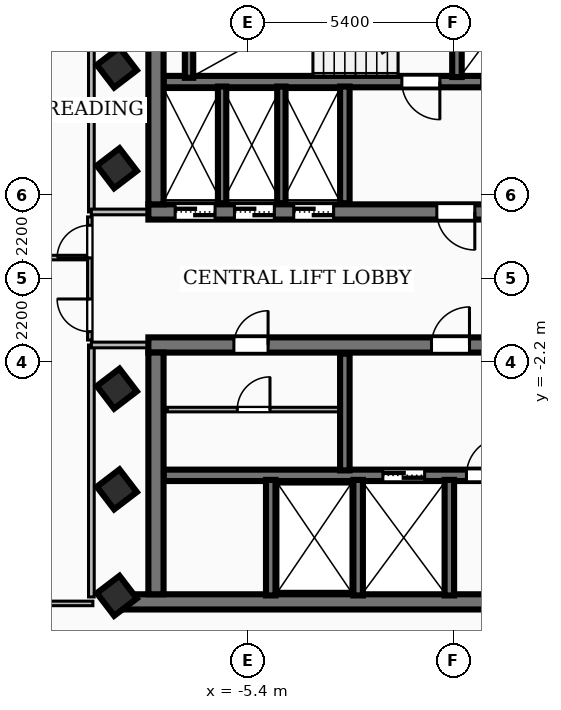
"""IFC4 building model, lengths in metres.
Left out: names, types, materials, properties, quantities, classifications, styles, units other than length and angle.
Written with IfcOpenShell. Run it as: python <this file> out.ifc"""

import sys

from ifc_helpers import new_model, si_unit, direction, frame, frame_2d, origin, origin_2d, place, context, subcontext, project, spatial, rectangle, extrude, element, fill, save


model = new_model("IFC4")
c1 = context("Model", 3, precision=1e-05, world=origin(), true_north=direction((0.0, 1.0)))
c2 = subcontext(c1, "Body", "Model", "MODEL_VIEW")
j1 = project(units=[si_unit("LENGTHUNIT", "METRE"), si_unit("PLANEANGLEUNIT", "RADIAN")], contexts=[c1])
p1 = place(None, origin())
s1 = spatial("IfcSite", under=j1, at=p1, CompositionType="ELEMENT")
p2 = place(p1, origin())
s2 = spatial("IfcBuilding", under=s1, at=p2, CompositionType="ELEMENT")
p3 = place(p2, frame((0.0, 0.0, 232.56)))
s3 = spatial("IfcBuildingStorey", under=s2, at=p3, CompositionType="ELEMENT", Elevation=232.56)
p4 = place(p3, frame((8.02, 1.75, 0.0), z_axis=(0.0, 0.0, 1.0), x_axis=(-1.0, 0.0, 0.0)))
e1 = element("IfcWall", 1, at=p4, inside=s3, PredefinedType="SHEAR", context=c2, shape_type="SweptSolid", body=[
    extrude(rectangle(XDim=16.04, YDim=0.4, at=frame_2d((8.02, 0.0))), origin(), (0.0, 0.0, 1.0), 3.14),
])
p5 = place(p4, frame((7.45, 0.0, 0.0)))
e2 = element("IfcOpeningElement", 2, at=p5, cuts=e1, PredefinedType="OPENING", context=c2, shape_type="SweptSolid", body=[
    extrude(rectangle(XDim=1.0, YDim=2.1, at=frame_2d((0.5, 1.05))), frame((0.0, 0.21, 0.0), z_axis=(0.0, -1.0, 0.0), x_axis=(1.0, 0.0, 0.0)), (0.0, 0.0, 1.0), 0.42),
])
p6 = place(p4, frame((14.285, 0.0, 0.0)))
e3 = element("IfcOpeningElement", 3, at=p6, cuts=e1, PredefinedType="OPENING", context=c2, shape_type="SweptSolid", body=[
    extrude(rectangle(XDim=1.05, YDim=2.15, at=frame_2d((0.525, 1.075))), frame((0.0, 0.21, 0.0), z_axis=(0.0, -1.0, 0.0), x_axis=(1.0, 0.0, 0.0)), (0.0, 0.0, 1.0), 0.42),
])
p7 = place(p4, frame((12.725, 0.0, 0.0)))
e4 = element("IfcOpeningElement", 4, at=p7, cuts=e1, PredefinedType="OPENING", context=c2, shape_type="SweptSolid", body=[
    extrude(rectangle(XDim=1.05, YDim=2.15, at=frame_2d((0.525, 1.075))), frame((0.0, 0.21, 0.0), z_axis=(0.0, -1.0, 0.0), x_axis=(1.0, 0.0, 0.0)), (0.0, 0.0, 1.0), 0.42),
])
p8 = place(p4, frame((11.165, 0.0, 0.0)))
e5 = element("IfcOpeningElement", 5, at=p8, cuts=e1, PredefinedType="OPENING", context=c2, shape_type="SweptSolid", body=[
    extrude(rectangle(XDim=1.05, YDim=2.15, at=frame_2d((0.525, 1.075))), frame((0.0, 0.21, 0.0), z_axis=(0.0, -1.0, 0.0), x_axis=(1.0, 0.0, 0.0)), (0.0, 0.0, 1.0), 0.42),
])
p9 = place(p4, frame((3.85, 0.0, 0.0)))
e6 = element("IfcOpeningElement", 6, at=p9, cuts=e1, PredefinedType="OPENING", context=c2, shape_type="SweptSolid", body=[
    extrude(rectangle(XDim=0.9, YDim=2.06, at=frame_2d((0.45, 1.03))), frame((0.0, 0.21, 0.0), z_axis=(0.0, -1.0, 0.0), x_axis=(1.0, 0.0, 0.0)), (0.0, 0.0, 1.0), 0.42),
])
p10 = place(p4, frame((2.35, 0.0, 0.0)))
e7 = element("IfcOpeningElement", 7, at=p10, cuts=e1, PredefinedType="OPENING", context=c2, shape_type="SweptSolid", body=[
    extrude(rectangle(XDim=0.9, YDim=2.06, at=frame_2d((0.45, 1.03))), frame((0.0, 0.21, 0.0), z_axis=(0.0, -1.0, 0.0), x_axis=(1.0, 0.0, 0.0)), (0.0, 0.0, 1.0), 0.42),
])
p11 = place(p4, frame((0.8, 0.0, 0.0)))
e8 = element("IfcOpeningElement", 8, at=p11, cuts=e1, PredefinedType="OPENING", context=c2, shape_type="SweptSolid", body=[
    extrude(rectangle(XDim=0.9, YDim=2.06, at=frame_2d((0.45, 1.03))), frame((0.0, 0.21, 0.0), z_axis=(0.0, -1.0, 0.0), x_axis=(1.0, 0.0, 0.0)), (0.0, 0.0, 1.0), 0.42),
])
p12 = place(p3, frame((-7.82, 1.95, 0.0), z_axis=(0.0, 0.0, 1.0), x_axis=(0.0, 1.0, 0.0)))
e9 = element("IfcWall", 9, at=p12, inside=s3, PredefinedType="SHEAR", context=c2, shape_type="SweptSolid", body=[
    extrude(rectangle(XDim=6.36, YDim=0.4, at=frame_2d((3.18, 0.0))), origin(), (0.0, 0.0, 1.0), 3.14),
])
p13 = place(p3, frame((7.62, 5.18, 0.0), z_axis=(0.0, 0.0, 1.0), x_axis=(-1.0, 0.0, 0.0)))
e10 = element("IfcWall", 10, at=p13, inside=s3, PredefinedType="SOLIDWALL", context=c2, shape_type="SweptSolid", body=[
    extrude(rectangle(XDim=15.24, YDim=0.3, at=frame_2d((7.62, 0.0))), origin(), (0.0, 0.0, 1.0), 3.14),
])
p14 = place(p13, frame((5.77, 0.0, 0.0)))
e11 = element("IfcOpeningElement", 11, at=p14, cuts=e10, PredefinedType="OPENING", context=c2, shape_type="SweptSolid", body=[
    extrude(rectangle(XDim=1.1, YDim=2.15, at=frame_2d((0.55, 1.075))), frame((0.0, 0.16, 0.0), z_axis=(0.0, -1.0, 0.0), x_axis=(1.0, 0.0, 0.0)), (0.0, 0.0, 1.0), 0.32),
])
p15 = place(p13, frame((2.97, 0.0, 0.0)))
e12 = element("IfcOpeningElement", 12, at=p15, cuts=e10, PredefinedType="OPENING", context=c2, shape_type="SweptSolid", body=[
    extrude(rectangle(XDim=1.1, YDim=2.15, at=frame_2d((0.55, 1.075))), frame((0.0, 0.16, 0.0), z_axis=(0.0, -1.0, 0.0), x_axis=(1.0, 0.0, 0.0)), (0.0, 0.0, 1.0), 0.32),
])
p16 = place(p13, frame((7.97, 0.0, 0.0)))
e13 = element("IfcOpeningElement", 13, at=p16, cuts=e10, PredefinedType="OPENING", context=c2, shape_type="SweptSolid", body=[
    extrude(rectangle(XDim=1.0, YDim=2.1, at=frame_2d((0.5, 1.05))), frame((0.0, 0.16, 0.0), z_axis=(0.0, -1.0, 0.0), x_axis=(1.0, 0.0, 0.0)), (0.0, 0.0, 1.0), 0.32),
])
p17 = place(p3, frame((8.78, -8.51, 0.0), z_axis=(0.0, 0.0, 1.0), x_axis=(-1.0, 0.0, 0.0)))
e14 = element("IfcWall", 14, at=p17, inside=s3, PredefinedType="SHEAR", context=c2, shape_type="SweptSolid", body=[
    extrude(rectangle(XDim=17.56, YDim=0.4, at=frame_2d((8.78, 0.0))), origin(), (0.0, 0.0, 1.0), 3.14),
])
p18 = place(p3, frame((-8.02, -1.75, 0.0), z_axis=(0.0, 0.0, 1.0), x_axis=(1.0, 0.0, 0.0)))
e15 = element("IfcWall", 15, at=p18, inside=s3, PredefinedType="SHEAR", context=c2, shape_type="SweptSolid", body=[
    extrude(rectangle(XDim=16.04, YDim=0.4, at=frame_2d((8.02, 0.0))), origin(), (0.0, 0.0, 1.0), 3.14),
])
p19 = place(p18, frame((7.45, 0.0, 0.0)))
e16 = element("IfcOpeningElement", 16, at=p19, cuts=e15, PredefinedType="OPENING", context=c2, shape_type="SweptSolid", body=[
    extrude(rectangle(XDim=1.0, YDim=2.1, at=frame_2d((0.5, 1.05))), frame((0.0, 0.21, 0.0), z_axis=(0.0, -1.0, 0.0), x_axis=(1.0, 0.0, 0.0)), (0.0, 0.0, 1.0), 0.42),
])
p20 = place(p18, frame((12.65, 0.0, 0.0)))
e17 = element("IfcOpeningElement", 17, at=p20, cuts=e15, PredefinedType="OPENING", context=c2, shape_type="SweptSolid", body=[
    extrude(rectangle(XDim=0.9, YDim=2.06, at=frame_2d((0.45, 1.03))), frame((0.0, 0.21, 0.0), z_axis=(0.0, -1.0, 0.0), x_axis=(1.0, 0.0, 0.0)), (0.0, 0.0, 1.0), 0.42),
])
p21 = place(p18, frame((2.25, 0.0, 0.0)))
e18 = element("IfcOpeningElement", 18, at=p21, cuts=e15, PredefinedType="OPENING", context=c2, shape_type="SweptSolid", body=[
    extrude(rectangle(XDim=0.9, YDim=2.06, at=frame_2d((0.45, 1.03))), frame((0.0, 0.21, 0.0), z_axis=(0.0, -1.0, 0.0), x_axis=(1.0, 0.0, 0.0)), (0.0, 0.0, 1.0), 0.42),
])
p22 = place(p3, frame((-7.82, -8.31, 0.0), z_axis=(0.0, 0.0, 1.0), x_axis=(0.0, 1.0, 0.0)))
e19 = element("IfcWall", 19, at=p22, inside=s3, PredefinedType="SHEAR", context=c2, shape_type="SweptSolid", body=[
    extrude(rectangle(XDim=6.36, YDim=0.4, at=frame_2d((3.18, 0.0))), origin(), (0.0, 0.0, 1.0), 3.14),
])
p23 = place(p3, frame((-7.62, -5.18, 0.0), z_axis=(0.0, 0.0, 1.0), x_axis=(1.0, 0.0, 0.0)))
e20 = element("IfcWall", 20, at=p23, inside=s3, PredefinedType="SOLIDWALL", context=c2, shape_type="SweptSolid", body=[
    extrude(rectangle(XDim=15.24, YDim=0.3, at=frame_2d((7.62, 0.0))), origin(), (0.0, 0.0, 1.0), 3.14),
])
p24 = place(p23, frame((5.77, 0.0, 0.0)))
e21 = element("IfcOpeningElement", 21, at=p24, cuts=e20, PredefinedType="OPENING", context=c2, shape_type="SweptSolid", body=[
    extrude(rectangle(XDim=1.1, YDim=2.15, at=frame_2d((0.55, 1.075))), frame((0.0, 0.16, 0.0), z_axis=(0.0, -1.0, 0.0), x_axis=(1.0, 0.0, 0.0)), (0.0, 0.0, 1.0), 0.32),
])
p25 = place(p23, frame((7.97, 0.0, 0.0)))
e22 = element("IfcOpeningElement", 22, at=p25, cuts=e20, PredefinedType="OPENING", context=c2, shape_type="SweptSolid", body=[
    extrude(rectangle(XDim=1.0, YDim=2.1, at=frame_2d((0.5, 1.05))), frame((0.0, 0.16, 0.0), z_axis=(0.0, -1.0, 0.0), x_axis=(1.0, 0.0, 0.0)), (0.0, 0.0, 1.0), 0.32),
])
p26 = place(p3, frame((-6.95, 5.28, 0.0), z_axis=(0.0, 0.0, 1.0), x_axis=(0.0, 1.0, 0.0)))
e23 = element("IfcWall", 23, at=p26, inside=s3, PredefinedType="SOLIDWALL", context=c2, shape_type="SweptSolid", body=[
    extrude(rectangle(XDim=3.06, YDim=0.22, at=frame_2d((1.53, 0.0))), origin(), (0.0, 0.0, 1.0), 3.14),
])
p27 = place(p3, frame((0.1, 5.3, 0.0), z_axis=(0.0, 0.0, 1.0), x_axis=(0.0, 1.0, 0.0)))
e24 = element("IfcWall", 24, at=p27, inside=s3, PredefinedType="SOLIDWALL", context=c2, shape_type="SweptSolid", body=[
    extrude(rectangle(XDim=3.04, YDim=0.25, at=frame_2d((1.52, 0.0))), origin(), (0.0, 0.0, 1.0), 3.14),
])
p28 = place(p3, frame((-2.85, 1.98, 0.0), z_axis=(0.0, 0.0, 1.0), x_axis=(0.0, 1.0, 0.0)))
e25 = element("IfcWall", 25, at=p28, inside=s3, PredefinedType="SOLIDWALL", context=c2, shape_type="SweptSolid", body=[
    extrude(rectangle(XDim=3.07, YDim=0.25, at=frame_2d((1.535, 0.0))), origin(), (0.0, 0.0, 1.0), 3.14),
])
for number, where, z_axis, x_axis in (
    (26, (-0.1, -8.34, 0.0), (0.0, 0.0, 1.0), (0.0, 1.0, 0.0)),
    (27, (-2.5, -8.34, 0.0), (0.0, 0.0, 1.0), (0.0, 1.0, 0.0)),
    (28, (-4.8, -8.34, 0.0), (0.0, 0.0, 1.0), (0.0, 1.0, 0.0)),
):
    element("IfcWall", number, at=place(p3, frame(where, z_axis=z_axis, x_axis=x_axis)), inside=s3, PredefinedType="SOLIDWALL", context=c2, shape_type="SweptSolid", body=[
        extrude(rectangle(XDim=3.04, YDim=0.25, at=frame_2d((1.52, 0.0))), origin(), (0.0, 0.0, 1.0), 3.14),
    ])
p29 = place(p3, frame((-2.85, -5.05, 0.0), z_axis=(0.0, 0.0, 1.0), x_axis=(0.0, 1.0, 0.0)))
e29 = element("IfcWall", 29, at=p29, inside=s3, PredefinedType="SOLIDWALL", context=c2, shape_type="SweptSolid", body=[
    extrude(rectangle(XDim=3.07, YDim=0.25, at=frame_2d((1.535, 0.0))), origin(), (0.0, 0.0, 1.0), 3.14),
])
for number, where, z_axis, x_axis in (
    (30, (-6.08, 1.98, 0.0), (0.0, 0.0, 1.0), (0.0, 1.0, 0.0)),
    (31, (-4.52, 1.98, 0.0), (0.0, 0.0, 1.0), (0.0, 1.0, 0.0)),
):
    element("IfcWall", number, at=place(p3, frame(where, z_axis=z_axis, x_axis=x_axis)), inside=s3, PredefinedType="SOLIDWALL", context=c2, shape_type="SweptSolid", body=[
        extrude(rectangle(XDim=3.07, YDim=0.22, at=frame_2d((1.535, 0.0))), origin(), (0.0, 0.0, 1.0), 3.14),
    ])
for number, where, z_axis, x_axis in (
    (32, (-8.85, -5.55, 0.0), (0.0, 0.0, 1.0), (0.794, 0.607, 0.0)),
    (33, (-8.85, -2.9, 0.0), (0.0, 0.0, 1.0), (0.794, 0.607, 0.0)),
    (34, (-8.85, 2.9, 0.0), (0.0, 0.0, 1.0), (0.794, 0.607, 0.0)),
    (35, (-8.85, 5.55, 0.0), (0.0, 0.0, 1.0), (0.794, 0.607, 0.0)),
    (36, (-8.85, -8.35, 0.0), (0.0, 0.0, 1.0), (0.794, 0.607, 0.0)),
):
    element("IfcColumn", number, at=place(p3, frame(where, z_axis=z_axis, x_axis=x_axis)), inside=s3, PredefinedType="COLUMN", context=c2, shape_type="SweptSolid", body=[
        extrude(rectangle(XDim=0.75, YDim=0.75, at=origin_2d()), origin(), (0.0, 0.0, 1.0), 3.42),
    ])
p30 = place(p3, frame((-3.607, -19.074, 0.0), z_axis=(0.0, 0.0, 1.0), x_axis=(-0.607353275552, 0.794431871639, 0.0)))
e37 = element("IfcWall", 37, at=p30, inside=s3, PredefinedType="SOLIDWALL", context=c2, shape_type="SweptSolid", body=[
    extrude(rectangle(XDim=25.924, YDim=0.2, at=frame_2d((12.962, 0.0))), origin(), (0.0, 0.0, 1.0), 3.14),
])
p31 = place(p30, frame((19.321, 0.0, 0.85)))
e38 = element("IfcOpeningElement", 38, at=p31, cuts=e37, PredefinedType="OPENING", context=c2, shape_type="SweptSolid", body=[
    extrude(rectangle(XDim=1.8, YDim=1.6, at=frame_2d((0.9, 0.8))), frame((0.0, 0.11, 0.0), z_axis=(0.0, -1.0, 0.0), x_axis=(1.0, 0.0, 0.0)), (0.0, 0.0, 1.0), 0.22),
])
p32 = place(p3, frame((-7.52, -3.45, 0.0), z_axis=(0.0, 0.0, 1.0), x_axis=(1.0, 0.0, 0.0)))
e39 = element("IfcWall", 39, at=p32, inside=s3, PredefinedType="PARTITIONING", context=c2, shape_type="SweptSolid", body=[
    extrude(rectangle(XDim=4.54, YDim=0.12, at=frame_2d((2.27, 0.0))), origin(), (0.0, 0.0, 1.0), 3.14),
])
p33 = place(p32, frame((1.84, 0.0, 0.0)))
e40 = element("IfcOpeningElement", 40, at=p33, cuts=e39, PredefinedType="OPENING", context=c2, shape_type="SweptSolid", body=[
    extrude(rectangle(XDim=0.86, YDim=2.04, at=frame_2d((0.43, 1.02))), frame((0.0, 0.07, 0.0), z_axis=(0.0, -1.0, 0.0), x_axis=(1.0, 0.0, 0.0)), (0.0, 0.0, 1.0), 0.14),
])
p34 = place(p3, frame((-9.52, 1.75, 0.0), z_axis=(0.0, 0.0, 1.0), x_axis=(0.0, 1.0, 0.0)))
e41 = element("IfcWall", 41, at=p34, inside=s3, PredefinedType="PARTITIONING", context=c2, shape_type="SweptSolid", body=[
    extrude(rectangle(XDim=6.63, YDim=0.15, at=frame_2d((3.315, 0.0))), origin(), (0.0, 0.0, 1.0), 3.14),
])
p35 = place(p3, frame((-7.85, 1.75, 0.0), z_axis=(0.0, 0.0, 1.0), x_axis=(-1.0, 0.0, 0.0)))
e42 = element("IfcWall", 42, at=p35, inside=s3, PredefinedType="PARTITIONING", context=c2, shape_type="SweptSolid", body=[
    extrude(rectangle(XDim=1.67, YDim=0.15, at=frame_2d((0.835, 0.0))), origin(), (0.0, 0.0, 1.0), 2.37),
])
p36 = place(p3, frame((-9.52, -8.38, 0.0), z_axis=(0.0, 0.0, 1.0), x_axis=(0.0, 1.0, 0.0)))
e43 = element("IfcWall", 43, at=p36, inside=s3, PredefinedType="PARTITIONING", context=c2, shape_type="SweptSolid", body=[
    extrude(rectangle(XDim=6.63, YDim=0.15, at=frame_2d((3.315, 0.0))), origin(), (0.0, 0.0, 1.0), 3.14),
])
p37 = place(p3, frame((-7.85, -1.75, 0.0), z_axis=(0.0, 0.0, 1.0), x_axis=(-1.0, 0.0, 0.0)))
e44 = element("IfcWall", 44, at=p37, inside=s3, PredefinedType="PARTITIONING", context=c2, shape_type="SweptSolid", body=[
    extrude(rectangle(XDim=1.67, YDim=0.15, at=frame_2d((0.835, 0.0))), origin(), (0.0, 0.0, 1.0), 2.37),
])
p38 = place(p3, frame((-18.528, 0.55, 0.0), z_axis=(0.0, 0.0, 1.0), x_axis=(1.0, 0.0, 0.0)))
e45 = element("IfcWall", 45, at=p38, inside=s3, PredefinedType="PARTITIONING", context=c2, shape_type="SweptSolid", body=[
    extrude(rectangle(XDim=8.868, YDim=0.12, at=frame_2d((4.434, 0.0))), origin(), (0.0, 0.0, 1.0), 3.14),
])
p39 = place(p3, frame((-11.571, -8.55, 0.0), z_axis=(0.0, 0.0, 1.0), x_axis=(1.0, 0.0, 0.0)))
e46 = element("IfcWall", 46, at=p39, inside=s3, PredefinedType="PARTITIONING", context=c2, shape_type="SweptSolid", body=[
    extrude(rectangle(XDim=2.091, YDim=0.12, at=frame_2d((1.045, 0.0))), origin(), (0.0, 0.0, 1.0), 3.14),
])
p40 = place(p3, frame((-9.56, -1.62, 0.0), z_axis=(0.0, 0.0, 1.0), x_axis=(0.0, 1.0, 0.0)))
e47 = element("IfcWall", 47, at=p40, inside=s3, PredefinedType="PARTITIONING", context=c2, shape_type="SweptSolid", body=[
    extrude(rectangle(XDim=3.24, YDim=0.12, at=frame_2d((1.62, 0.0))), origin(), (0.0, 0.0, 1.0), 3.14),
])
p41 = place(p40, frame((0.22, 0.0, 0.0)))
e48 = element("IfcOpeningElement", 48, at=p41, cuts=e47, PredefinedType="OPENING", context=c2, shape_type="SweptSolid", body=[
    extrude(rectangle(XDim=0.86, YDim=2.04, at=frame_2d((0.43, 1.02))), frame((0.0, 0.07, 0.0), z_axis=(0.0, -1.0, 0.0), x_axis=(1.0, 0.0, 0.0)), (0.0, 0.0, 1.0), 0.14),
])
p42 = place(p40, frame((2.16, 0.0, 0.0)))
e49 = element("IfcOpeningElement", 49, at=p42, cuts=e47, PredefinedType="OPENING", context=c2, shape_type="SweptSolid", body=[
    extrude(rectangle(XDim=0.86, YDim=2.04, at=frame_2d((0.43, 1.02))), frame((0.0, 0.07, 0.0), z_axis=(0.0, -1.0, 0.0), x_axis=(1.0, 0.0, 0.0)), (0.0, 0.0, 1.0), 0.14),
])
p43 = place(p3, frame((-17.068, 4.939, 0.0), z_axis=(0.0, 0.0, 1.0), x_axis=(0.794433927634, 0.607350586255, 0.0)))
e50 = element("IfcWall", 50, at=p43, inside=s3, PredefinedType="PARTITIONING", context=c2, shape_type="SweptSolid", body=[
    extrude(rectangle(XDim=20.58, YDim=0.12, at=frame_2d((10.29, 0.0))), origin(), (0.0, 0.0, 1.0), 2.51),
])
p44 = place(p43, frame((9.96, 0.0, 0.0)))
e51 = element("IfcOpeningElement", 51, at=p44, cuts=e50, PredefinedType="OPENING", context=c2, shape_type="SweptSolid", body=[
    extrude(rectangle(XDim=1.2, YDim=2.1, at=frame_2d((0.6, 1.05))), frame((0.0, 0.07, 0.0), z_axis=(0.0, -1.0, 0.0), x_axis=(1.0, 0.0, 0.0)), (0.0, 0.0, 1.0), 0.14),
])
p45 = place(p3, frame((17.068, -4.939, 0.0), z_axis=(0.0, 0.0, 1.0), x_axis=(-0.794433927634, -0.607350586255, 0.0)))
e52 = element("IfcWall", 52, at=p45, inside=s3, PredefinedType="PARTITIONING", context=c2, shape_type="SweptSolid", body=[
    extrude(rectangle(XDim=20.58, YDim=0.12, at=frame_2d((10.29, 0.0))), origin(), (0.0, 0.0, 1.0), 2.51),
])
p46 = place(p45, frame((9.96, 0.0, 0.0)))
e53 = element("IfcOpeningElement", 53, at=p46, cuts=e52, PredefinedType="OPENING", context=c2, shape_type="SweptSolid", body=[
    extrude(rectangle(XDim=1.2, YDim=2.1, at=frame_2d((0.6, 1.05))), frame((0.0, 0.07, 0.0), z_axis=(0.0, -1.0, 0.0), x_axis=(1.0, 0.0, 0.0)), (0.0, 0.0, 1.0), 0.14),
])
p47 = place(p5, origin())
e54 = element("IfcDoor", 54, at=p47, inside=s3, OperationType="SINGLE_SWING_LEFT", PredefinedType="DOOR", context=c2, shape_type="SweptSolid", body=[
    extrude(rectangle(XDim=1.0, YDim=2.1, at=frame_2d((0.5, 1.05))), frame((0.0, 0.025, 0.0), z_axis=(0.0, -1.0, 0.0), x_axis=(1.0, 0.0, 0.0)), (0.0, 0.0, 1.0), 0.05),
])
fill(e2, e54)
p48 = place(p19, origin())
e55 = element("IfcDoor", 55, at=p48, inside=s3, OperationType="SINGLE_SWING_RIGHT", PredefinedType="DOOR", context=c2, shape_type="SweptSolid", body=[
    extrude(rectangle(XDim=1.0, YDim=2.1, at=frame_2d((0.5, 1.05))), frame((0.0, 0.025, 0.0), z_axis=(0.0, -1.0, 0.0), x_axis=(1.0, 0.0, 0.0)), (0.0, 0.0, 1.0), 0.05),
])
fill(e16, e55)
p49 = place(p16, origin())
e56 = element("IfcDoor", 56, at=p49, inside=s3, OperationType="SINGLE_SWING_LEFT", PredefinedType="DOOR", context=c2, shape_type="SweptSolid", body=[
    extrude(rectangle(XDim=1.0, YDim=2.1, at=frame_2d((0.5, 1.05))), frame((0.0, 0.025, 0.0), z_axis=(0.0, -1.0, 0.0), x_axis=(1.0, 0.0, 0.0)), (0.0, 0.0, 1.0), 0.05),
])
fill(e13, e56)
p50 = place(p24, origin())
e57 = element("IfcDoor", 57, at=p50, inside=s3, OperationType="DOUBLE_DOOR_SLIDING", PredefinedType="DOOR", context=c2, shape_type="SweptSolid", body=[
    extrude(rectangle(XDim=1.1, YDim=2.15, at=frame_2d((0.55, 1.075))), frame((0.0, 0.025, 0.0), z_axis=(0.0, -1.0, 0.0), x_axis=(1.0, 0.0, 0.0)), (0.0, 0.0, 1.0), 0.05),
])
fill(e21, e57)
p51 = place(p25, origin())
e58 = element("IfcDoor", 58, at=p51, inside=s3, OperationType="SINGLE_SWING_RIGHT", PredefinedType="DOOR", context=c2, shape_type="SweptSolid", body=[
    extrude(rectangle(XDim=1.0, YDim=2.1, at=frame_2d((0.5, 1.05))), frame((0.0, 0.025, 0.0), z_axis=(0.0, -1.0, 0.0), x_axis=(1.0, 0.0, 0.0)), (0.0, 0.0, 1.0), 0.05),
])
fill(e22, e58)
p52 = place(p6, origin())
e59 = element("IfcDoor", 59, at=p52, inside=s3, OperationType="DOUBLE_DOOR_SLIDING", PredefinedType="DOOR", context=c2, shape_type="SweptSolid", body=[
    extrude(rectangle(XDim=1.05, YDim=2.15, at=frame_2d((0.525, 1.075))), frame((0.0, 0.025, 0.0), z_axis=(0.0, -1.0, 0.0), x_axis=(1.0, 0.0, 0.0)), (0.0, 0.0, 1.0), 0.05),
])
fill(e3, e59)
p53 = place(p7, origin())
e60 = element("IfcDoor", 60, at=p53, inside=s3, OperationType="DOUBLE_DOOR_SLIDING", PredefinedType="DOOR", context=c2, shape_type="SweptSolid", body=[
    extrude(rectangle(XDim=1.05, YDim=2.15, at=frame_2d((0.525, 1.075))), frame((0.0, 0.025, 0.0), z_axis=(0.0, -1.0, 0.0), x_axis=(1.0, 0.0, 0.0)), (0.0, 0.0, 1.0), 0.05),
])
fill(e4, e60)
p54 = place(p8, origin())
e61 = element("IfcDoor", 61, at=p54, inside=s3, OperationType="DOUBLE_DOOR_SLIDING", PredefinedType="DOOR", context=c2, shape_type="SweptSolid", body=[
    extrude(rectangle(XDim=1.05, YDim=2.15, at=frame_2d((0.525, 1.075))), frame((0.0, 0.025, 0.0), z_axis=(0.0, -1.0, 0.0), x_axis=(1.0, 0.0, 0.0)), (0.0, 0.0, 1.0), 0.05),
])
fill(e5, e61)
p55 = place(p21, origin())
e62 = element("IfcDoor", 62, at=p55, inside=s3, OperationType="SINGLE_SWING_RIGHT", PredefinedType="DOOR", context=c2, shape_type="SweptSolid", body=[
    extrude(rectangle(XDim=0.9, YDim=2.06, at=frame_2d((0.45, 1.03))), frame((0.0, 0.025, 0.0), z_axis=(0.0, -1.0, 0.0), x_axis=(1.0, 0.0, 0.0)), (0.0, 0.0, 1.0), 0.05),
])
fill(e18, e62)
p56 = place(p33, origin())
e63 = element("IfcDoor", 63, at=p56, inside=s3, OperationType="SINGLE_SWING_RIGHT", PredefinedType="DOOR", context=c2, shape_type="SweptSolid", body=[
    extrude(rectangle(XDim=0.86, YDim=2.04, at=frame_2d((0.43, 1.02))), frame((0.0, 0.025, 0.0), z_axis=(0.0, -1.0, 0.0), x_axis=(1.0, 0.0, 0.0)), (0.0, 0.0, 1.0), 0.05),
])
fill(e40, e63)
p57 = place(p41, origin())
e64 = element("IfcDoor", 64, at=p57, inside=s3, OperationType="SINGLE_SWING_RIGHT", PredefinedType="DOOR", context=c2, shape_type="SweptSolid", body=[
    extrude(rectangle(XDim=0.86, YDim=2.04, at=frame_2d((0.43, 1.02))), frame((0.0, 0.025, 0.0), z_axis=(0.0, -1.0, 0.0), x_axis=(1.0, 0.0, 0.0)), (0.0, 0.0, 1.0), 0.05),
])
fill(e48, e64)
p58 = place(p42, origin())
e65 = element("IfcDoor", 65, at=p58, inside=s3, OperationType="SINGLE_SWING_LEFT", PredefinedType="DOOR", context=c2, shape_type="SweptSolid", body=[
    extrude(rectangle(XDim=0.86, YDim=2.04, at=frame_2d((0.43, 1.02))), frame((0.0, 0.025, 0.0), z_axis=(0.0, -1.0, 0.0), x_axis=(1.0, 0.0, 0.0)), (0.0, 0.0, 1.0), 0.05),
])
fill(e49, e65)
save(model, sys.argv[1])
